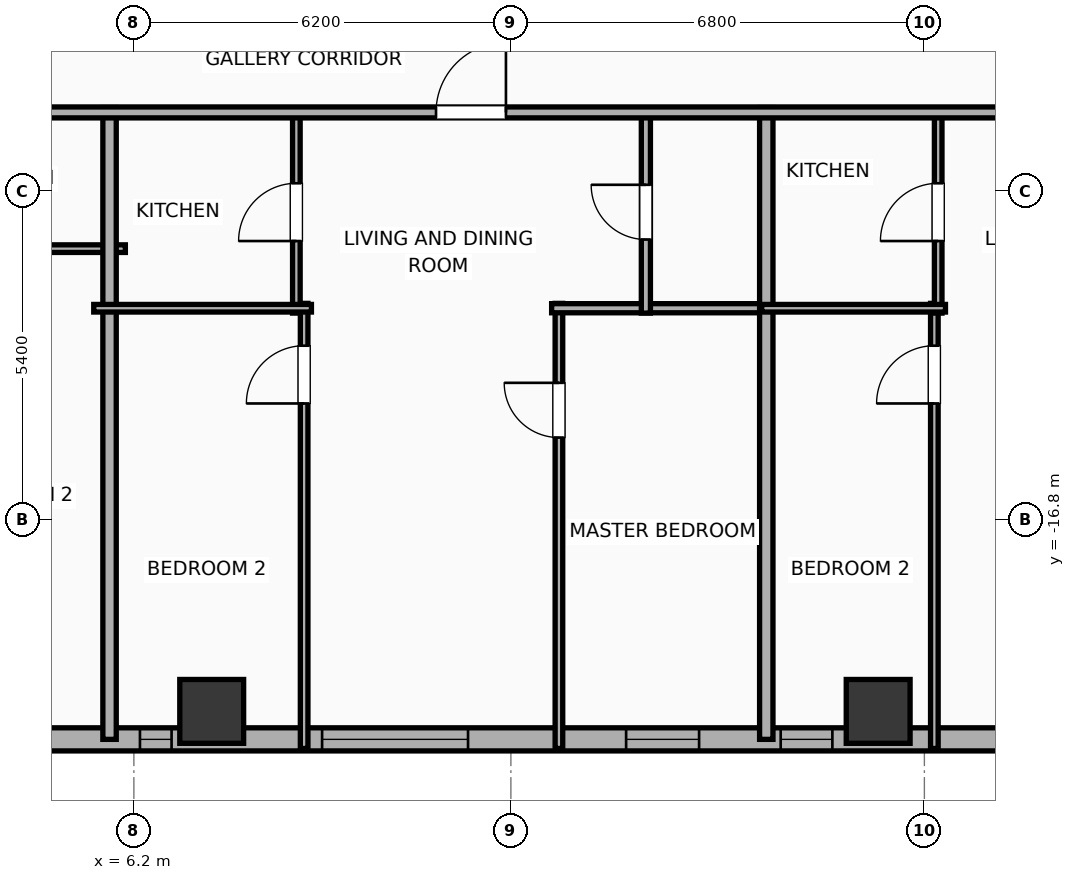
"""IFC4 building model, lengths in metres.
Left out: names, types, materials, properties, quantities, classifications, styles, units other than length and angle.
Written with IfcOpenShell. Run it as: python <this file> out.ifc"""

import sys

from ifc_helpers import new_model, si_unit, direction, frame, frame_2d, origin, origin_2d, place, context, subcontext, project, spatial, rectangle, hollow_rectangle, extrude, element, fill, save


model = new_model("IFC4")
c1 = context("Model", 3, precision=1e-05, world=origin(), true_north=direction((0.0, 1.0)))
c2 = subcontext(c1, "Body", "Model", "MODEL_VIEW")
j1 = project(units=[si_unit("LENGTHUNIT", "METRE"), si_unit("PLANEANGLEUNIT", "RADIAN")], contexts=[c1])
p1 = place(None, origin())
s1 = spatial("IfcSite", under=j1, at=p1, CompositionType="ELEMENT")
p2 = place(p1, origin())
s2 = spatial("IfcBuilding", under=s1, at=p2, CompositionType="ELEMENT")
p3 = place(p2, frame((0.0, 0.0, 101.4)))
s3 = spatial("IfcBuildingStorey", under=s2, at=p3, CompositionType="ELEMENT", Elevation=101.4)
for number, where, z_axis, x_axis in (
    (1, (7.48, -19.95, 0.0), (0.0, 0.0, 1.0), (1.0, 0.0, 0.0)),
    (2, (18.44, -19.95, 0.0), (0.0, 0.0, 1.0), (1.0, 0.0, 0.0)),
):
    element("IfcColumn", number, at=place(p3, frame(where, z_axis=z_axis, x_axis=x_axis)), inside=s3, PredefinedType="COLUMN", context=c2, shape_type="SweptSolid", body=[
        extrude(hollow_rectangle(XDim=1.05, YDim=1.05, WallThickness=0.036, at=origin_2d()), origin(), (0.0, 0.0, 1.0), 3.9),
    ])
p4 = place(p3, frame((29.381, -20.41, 0.0), z_axis=(0.0, 0.0, 1.0), x_axis=(-1.0, 0.0, 0.0)))
e3 = element("IfcWall", 3, at=p4, inside=s3, PredefinedType="ELEMENTEDWALL", context=c2, shape_type="SweptSolid", body=[
    extrude(rectangle(XDim=54.763, YDim=0.38, at=frame_2d((27.381, 0.0))), origin(), (0.0, 0.0, 1.0), 3.65),
])
p5 = place(p4, frame((6.495, 0.0, 0.75)))
e4 = element("IfcOpeningElement", 4, at=p5, cuts=e3, PredefinedType="OPENING", context=c2, shape_type="SweptSolid", body=[
    extrude(rectangle(XDim=2.4, YDim=2.1, at=frame_2d((1.2, 1.05))), frame((0.0, 0.2, 0.0), z_axis=(0.0, -1.0, 0.0), x_axis=(1.0, 0.0, 0.0)), (0.0, 0.0, 1.0), 0.4),
])
p6 = place(p4, frame((17.686, 0.0, 0.75)))
e5 = element("IfcOpeningElement", 5, at=p6, cuts=e3, PredefinedType="OPENING", context=c2, shape_type="SweptSolid", body=[
    extrude(rectangle(XDim=2.4, YDim=2.1, at=frame_2d((1.2, 1.05))), frame((0.0, 0.2, 0.0), z_axis=(0.0, -1.0, 0.0), x_axis=(1.0, 0.0, 0.0)), (0.0, 0.0, 1.0), 0.4),
])
p7 = place(p4, frame((34.677, 0.0, 0.75)))
e6 = element("IfcOpeningElement", 6, at=p7, cuts=e3, PredefinedType="OPENING", context=c2, shape_type="SweptSolid", body=[
    extrude(rectangle(XDim=2.4, YDim=2.1, at=frame_2d((1.2, 1.05))), frame((0.0, 0.2, 0.0), z_axis=(0.0, -1.0, 0.0), x_axis=(1.0, 0.0, 0.0)), (0.0, 0.0, 1.0), 0.4),
])
p8 = place(p4, frame((45.867, 0.0, 0.75)))
e7 = element("IfcOpeningElement", 7, at=p8, cuts=e3, PredefinedType="OPENING", context=c2, shape_type="SweptSolid", body=[
    extrude(rectangle(XDim=2.4, YDim=2.1, at=frame_2d((1.2, 1.05))), frame((0.0, 0.2, 0.0), z_axis=(0.0, -1.0, 0.0), x_axis=(1.0, 0.0, 0.0)), (0.0, 0.0, 1.0), 0.4),
])
p9 = place(p4, frame((52.281, 0.0, 0.75)))
e8 = element("IfcOpeningElement", 8, at=p9, cuts=e3, PredefinedType="OPENING", context=c2, shape_type="SweptSolid", body=[
    extrude(rectangle(XDim=1.2, YDim=2.05, at=frame_2d((0.6, 1.025))), frame((0.0, 0.2, 0.0), z_axis=(0.0, -1.0, 0.0), x_axis=(1.0, 0.0, 0.0)), (0.0, 0.0, 1.0), 0.4),
])
p10 = place(p4, frame((49.641, 0.0, 0.75)))
e9 = element("IfcOpeningElement", 9, at=p10, cuts=e3, PredefinedType="OPENING", context=c2, shape_type="SweptSolid", body=[
    extrude(rectangle(XDim=1.2, YDim=2.05, at=frame_2d((0.6, 1.025))), frame((0.0, 0.2, 0.0), z_axis=(0.0, -1.0, 0.0), x_axis=(1.0, 0.0, 0.0)), (0.0, 0.0, 1.0), 0.4),
])
p11 = place(p4, frame((39.543, 0.0, 0.75)))
e10 = element("IfcOpeningElement", 10, at=p11, cuts=e3, PredefinedType="OPENING", context=c2, shape_type="SweptSolid", body=[
    extrude(rectangle(XDim=1.2, YDim=2.05, at=frame_2d((0.6, 1.025))), frame((0.0, 0.2, 0.0), z_axis=(0.0, -1.0, 0.0), x_axis=(1.0, 0.0, 0.0)), (0.0, 0.0, 1.0), 0.4),
])
p12 = place(p4, frame((44.538, 0.0, 0.75)))
e11 = element("IfcOpeningElement", 11, at=p12, cuts=e3, PredefinedType="OPENING", context=c2, shape_type="SweptSolid", body=[
    extrude(rectangle(XDim=0.52, YDim=2.05, at=frame_2d((0.26, 1.025))), frame((0.0, 0.2, 0.0), z_axis=(0.0, -1.0, 0.0), x_axis=(1.0, 0.0, 0.0)), (0.0, 0.0, 1.0), 0.4),
])
p13 = place(p4, frame((28.206, 0.0, 0.75)))
e12 = element("IfcOpeningElement", 12, at=p13, cuts=e3, PredefinedType="OPENING", context=c2, shape_type="SweptSolid", body=[
    extrude(rectangle(XDim=1.2, YDim=2.05, at=frame_2d((0.6, 1.025))), frame((0.0, 0.2, 0.0), z_axis=(0.0, -1.0, 0.0), x_axis=(1.0, 0.0, 0.0)), (0.0, 0.0, 1.0), 0.4),
])
p14 = place(p4, frame((31.241, 0.0, 0.75)))
e13 = element("IfcOpeningElement", 13, at=p14, cuts=e3, PredefinedType="OPENING", context=c2, shape_type="SweptSolid", body=[
    extrude(rectangle(XDim=0.85, YDim=2.05, at=frame_2d((0.425, 1.025))), frame((0.0, 0.2, 0.0), z_axis=(0.0, -1.0, 0.0), x_axis=(1.0, 0.0, 0.0)), (0.0, 0.0, 1.0), 0.4),
])
p15 = place(p4, frame((24.561, 0.0, 0.75)))
e14 = element("IfcOpeningElement", 14, at=p15, cuts=e3, PredefinedType="OPENING", context=c2, shape_type="SweptSolid", body=[
    extrude(rectangle(XDim=1.2, YDim=2.05, at=frame_2d((0.6, 1.025))), frame((0.0, 0.2, 0.0), z_axis=(0.0, -1.0, 0.0), x_axis=(1.0, 0.0, 0.0)), (0.0, 0.0, 1.0), 0.4),
])
p16 = place(p4, frame((22.561, 0.0, 0.75)))
e15 = element("IfcOpeningElement", 15, at=p16, cuts=e3, PredefinedType="OPENING", context=c2, shape_type="SweptSolid", body=[
    extrude(rectangle(XDim=0.52, YDim=2.05, at=frame_2d((0.26, 1.025))), frame((0.0, 0.2, 0.0), z_axis=(0.0, -1.0, 0.0), x_axis=(1.0, 0.0, 0.0)), (0.0, 0.0, 1.0), 0.4),
])
p17 = place(p4, frame((13.886, 0.0, 0.75)))
e16 = element("IfcOpeningElement", 16, at=p17, cuts=e3, PredefinedType="OPENING", context=c2, shape_type="SweptSolid", body=[
    extrude(rectangle(XDim=1.2, YDim=2.05, at=frame_2d((0.6, 1.025))), frame((0.0, 0.2, 0.0), z_axis=(0.0, -1.0, 0.0), x_axis=(1.0, 0.0, 0.0)), (0.0, 0.0, 1.0), 0.4),
])
p18 = place(p4, frame((11.694, 0.0, 0.75)))
e17 = element("IfcOpeningElement", 17, at=p18, cuts=e3, PredefinedType="OPENING", context=c2, shape_type="SweptSolid", body=[
    extrude(rectangle(XDim=0.85, YDim=2.05, at=frame_2d((0.425, 1.025))), frame((0.0, 0.2, 0.0), z_axis=(0.0, -1.0, 0.0), x_axis=(1.0, 0.0, 0.0)), (0.0, 0.0, 1.0), 0.4),
])
p19 = place(p4, frame((3.286, 0.0, 0.75)))
e18 = element("IfcOpeningElement", 18, at=p19, cuts=e3, PredefinedType="OPENING", context=c2, shape_type="SweptSolid", body=[
    extrude(rectangle(XDim=1.2, YDim=2.05, at=frame_2d((0.6, 1.025))), frame((0.0, 0.2, 0.0), z_axis=(0.0, -1.0, 0.0), x_axis=(1.0, 0.0, 0.0)), (0.0, 0.0, 1.0), 0.4),
])
p20 = place(p4, frame((0.816, 0.0, 0.75)))
e19 = element("IfcOpeningElement", 19, at=p20, cuts=e3, PredefinedType="OPENING", context=c2, shape_type="SweptSolid", body=[
    extrude(rectangle(XDim=1.2, YDim=2.05, at=frame_2d((0.6, 1.025))), frame((0.0, 0.2, 0.0), z_axis=(0.0, -1.0, 0.0), x_axis=(1.0, 0.0, 0.0)), (0.0, 0.0, 1.0), 0.4),
])
p21 = place(p3, frame((2.56, -12.34, 0.0), z_axis=(0.0, 0.0, 1.0), x_axis=(1.0, 0.0, 0.0)))
e20 = element("IfcWall", 20, at=p21, inside=s3, PredefinedType="PARTITIONING", context=c2, shape_type="SweptSolid", body=[
    extrude(rectangle(XDim=3.5, YDim=0.125, at=frame_2d((1.75, 0.0))), origin(), (0.0, 0.0, 1.0), 3.65),
])
p22 = place(p3, frame((5.8, -20.41, 0.0), z_axis=(0.0, 0.0, 1.0), x_axis=(0.0, 1.0, 0.0)))
e21 = element("IfcWall", 21, at=p22, inside=s3, PredefinedType="PARTITIONING", context=c2, shape_type="SweptSolid", body=[
    extrude(rectangle(XDim=10.39, YDim=0.22, at=frame_2d((5.195, 0.0))), origin(), (0.0, 0.0, 1.0), 3.04),
])
p23 = place(p3, frame((9.0, -20.56, 0.0), z_axis=(0.0, 0.0, 1.0), x_axis=(0.0, 1.0, 0.0)))
e22 = element("IfcWall", 22, at=p23, inside=s3, PredefinedType="PARTITIONING", context=c2, shape_type="SweptSolid", body=[
    extrude(rectangle(XDim=7.32, YDim=0.125, at=frame_2d((3.66, 0.0))), origin(), (0.0, 0.0, 1.0), 3.65),
])
p24 = place(p23, frame((5.674, 0.0, 0.0)))
e23 = element("IfcOpeningElement", 23, at=p24, cuts=e22, PredefinedType="OPENING", context=c2, shape_type="SweptSolid", body=[
    extrude(rectangle(XDim=0.95, YDim=2.05, at=frame_2d((0.475, 1.025))), frame((0.0, 0.073, 0.0), z_axis=(0.0, -1.0, 0.0), x_axis=(1.0, 0.0, 0.0)), (0.0, 0.0, 1.0), 0.145),
])
p25 = place(p3, frame((13.19, -20.56, 0.0), z_axis=(0.0, 0.0, 1.0), x_axis=(0.0, 1.0, 0.0)))
e24 = element("IfcWall", 24, at=p25, inside=s3, PredefinedType="PARTITIONING", context=c2, shape_type="SweptSolid", body=[
    extrude(rectangle(XDim=7.32, YDim=0.125, at=frame_2d((3.66, 0.0))), origin(), (0.0, 0.0, 1.0), 3.65),
])
p26 = place(p25, frame((5.113, 0.0, 0.0)))
e25 = element("IfcOpeningElement", 25, at=p26, cuts=e24, PredefinedType="OPENING", context=c2, shape_type="SweptSolid", body=[
    extrude(rectangle(XDim=0.9, YDim=2.05, at=frame_2d((0.45, 1.025))), frame((0.0, 0.073, 0.0), z_axis=(0.0, -1.0, 0.0), x_axis=(1.0, 0.0, 0.0)), (0.0, 0.0, 1.0), 0.145),
])
p27 = place(p3, frame((13.07, -13.32, 0.0), z_axis=(0.0, 0.0, 1.0), x_axis=(1.0, 0.0, 0.0)))
e26 = element("IfcWall", 26, at=p27, inside=s3, PredefinedType="PLUMBINGWALL", context=c2, shape_type="SweptSolid", body=[
    extrude(rectangle(XDim=3.605, YDim=0.15, at=frame_2d((1.802, 0.0))), origin(), (0.0, 0.0, 1.0), 3.65),
])
p28 = place(p3, frame((8.872, -13.4, 0.0), z_axis=(0.0, 0.0, 1.0), x_axis=(0.0, 1.0, 0.0)))
e27 = element("IfcWall", 27, at=p28, inside=s3, PredefinedType="PARTITIONING", context=c2, shape_type="SweptSolid", body=[
    extrude(rectangle(XDim=3.32, YDim=0.125, at=frame_2d((1.66, 0.0))), origin(), (0.0, 0.0, 1.0), 3.65),
])
p29 = place(p28, frame((1.185, 0.0, 0.0)))
e28 = element("IfcOpeningElement", 28, at=p29, cuts=e27, PredefinedType="OPENING", context=c2, shape_type="SweptSolid", body=[
    extrude(rectangle(XDim=0.95, YDim=2.05, at=frame_2d((0.475, 1.025))), frame((0.0, 0.073, 0.0), z_axis=(0.0, -1.0, 0.0), x_axis=(1.0, 0.0, 0.0)), (0.0, 0.0, 1.0), 0.145),
])
p30 = place(p3, frame((5.54, -13.32, 0.0), z_axis=(0.0, 0.0, 1.0), x_axis=(1.0, 0.0, 0.0)))
e29 = element("IfcWall", 29, at=p30, inside=s3, PredefinedType="PARTITIONING", context=c2, shape_type="SweptSolid", body=[
    extrude(rectangle(XDim=3.58, YDim=0.125, at=frame_2d((1.79, 0.0))), origin(), (0.0, 0.0, 1.0), 3.65),
])
p31 = place(p3, frame((14.62, -13.4, 0.0), z_axis=(0.0, 0.0, 1.0), x_axis=(0.0, 1.0, 0.0)))
e30 = element("IfcWall", 30, at=p31, inside=s3, PredefinedType="PLUMBINGWALL", context=c2, shape_type="SweptSolid", body=[
    extrude(rectangle(XDim=3.32, YDim=0.15, at=frame_2d((1.66, 0.0))), origin(), (0.0, 0.0, 1.0), 3.65),
])
p32 = place(p31, frame((1.21, 0.0, 0.0)))
e31 = element("IfcOpeningElement", 31, at=p32, cuts=e30, PredefinedType="OPENING", context=c2, shape_type="SweptSolid", body=[
    extrude(rectangle(XDim=0.9, YDim=2.05, at=frame_2d((0.45, 1.025))), frame((0.0, 0.085, 0.0), z_axis=(0.0, -1.0, 0.0), x_axis=(1.0, 0.0, 0.0)), (0.0, 0.0, 1.0), 0.17),
])
p33 = place(p3, frame((16.6, -20.41, 0.0), z_axis=(0.0, 0.0, 1.0), x_axis=(0.0, 1.0, 0.0)))
e32 = element("IfcWall", 32, at=p33, inside=s3, PredefinedType="PARTITIONING", context=c2, shape_type="SweptSolid", body=[
    extrude(rectangle(XDim=10.39, YDim=0.22, at=frame_2d((5.195, 0.0))), origin(), (0.0, 0.0, 1.0), 3.65),
])
p34 = place(p3, frame((19.364, -20.56, 0.0), z_axis=(0.0, 0.0, 1.0), x_axis=(0.0, 1.0, 0.0)))
e33 = element("IfcWall", 33, at=p34, inside=s3, PredefinedType="PARTITIONING", context=c2, shape_type="SweptSolid", body=[
    extrude(rectangle(XDim=7.32, YDim=0.125, at=frame_2d((3.66, 0.0))), origin(), (0.0, 0.0, 1.0), 3.65),
])
p35 = place(p34, frame((5.674, 0.0, 0.0)))
e34 = element("IfcOpeningElement", 34, at=p35, cuts=e33, PredefinedType="OPENING", context=c2, shape_type="SweptSolid", body=[
    extrude(rectangle(XDim=0.95, YDim=2.05, at=frame_2d((0.475, 1.025))), frame((0.0, 0.073, 0.0), z_axis=(0.0, -1.0, 0.0), x_axis=(1.0, 0.0, 0.0)), (0.0, 0.0, 1.0), 0.145),
])
p36 = place(p3, frame((19.427, -13.4, 0.0), z_axis=(0.0, 0.0, 1.0), x_axis=(0.0, 1.0, 0.0)))
e35 = element("IfcWall", 35, at=p36, inside=s3, PredefinedType="PARTITIONING", context=c2, shape_type="SweptSolid", body=[
    extrude(rectangle(XDim=3.32, YDim=0.125, at=frame_2d((1.66, 0.0))), origin(), (0.0, 0.0, 1.0), 3.65),
])
p37 = place(p36, frame((1.185, 0.0, 0.0)))
e36 = element("IfcOpeningElement", 36, at=p37, cuts=e35, PredefinedType="OPENING", context=c2, shape_type="SweptSolid", body=[
    extrude(rectangle(XDim=0.95, YDim=2.05, at=frame_2d((0.475, 1.025))), frame((0.0, 0.073, 0.0), z_axis=(0.0, -1.0, 0.0), x_axis=(1.0, 0.0, 0.0)), (0.0, 0.0, 1.0), 0.145),
])
p38 = place(p3, frame((16.525, -13.32, 0.0), z_axis=(0.0, 0.0, 1.0), x_axis=(1.0, 0.0, 0.0)))
e37 = element("IfcWall", 37, at=p38, inside=s3, PredefinedType="PARTITIONING", context=c2, shape_type="SweptSolid", body=[
    extrude(rectangle(XDim=3.022, YDim=0.125, at=frame_2d((1.511, 0.0))), origin(), (0.0, 0.0, 1.0), 3.65),
])
p39 = place(p3, frame((-29.21, -10.1, 0.0), z_axis=(0.0, 0.0, 1.0), x_axis=(1.0, 0.0, 0.0)))
e38 = element("IfcWall", 38, at=p39, inside=s3, PredefinedType="PARTITIONING", context=c2, shape_type="SweptSolid", body=[
    extrude(rectangle(XDim=62.42, YDim=0.18, at=frame_2d((31.21, 0.0))), origin(), (0.0, 0.0, 1.0), 3.65),
])
p40 = place(p39, frame((3.033, 0.0, 0.0)))
e39 = element("IfcOpeningElement", 39, at=p40, cuts=e38, PredefinedType="OPENING", context=c2, shape_type="SweptSolid", body=[
    extrude(rectangle(XDim=0.9, YDim=2.05, at=frame_2d((0.45, 1.025))), frame((0.0, 0.1, 0.0), z_axis=(0.0, -1.0, 0.0), x_axis=(1.0, 0.0, 0.0)), (0.0, 0.0, 1.0), 0.2),
])
p41 = place(p39, frame((9.768, 0.0, 0.0)))
e40 = element("IfcOpeningElement", 40, at=p41, cuts=e38, PredefinedType="OPENING", context=c2, shape_type="SweptSolid", body=[
    extrude(rectangle(XDim=0.9, YDim=2.05, at=frame_2d((0.45, 1.025))), frame((0.0, 0.1, 0.0), z_axis=(0.0, -1.0, 0.0), x_axis=(1.0, 0.0, 0.0)), (0.0, 0.0, 1.0), 0.2),
])
p42 = place(p39, frame((18.65, 0.0, 0.0)))
e41 = element("IfcOpeningElement", 41, at=p42, cuts=e38, PredefinedType="OPENING", context=c2, shape_type="SweptSolid", body=[
    extrude(rectangle(XDim=1.15, YDim=2.05, at=frame_2d((0.575, 1.025))), frame((0.0, 0.1, 0.0), z_axis=(0.0, -1.0, 0.0), x_axis=(1.0, 0.0, 0.0)), (0.0, 0.0, 1.0), 0.2),
])
p43 = place(p39, frame((29.212, 0.0, 0.0)))
e42 = element("IfcOpeningElement", 42, at=p43, cuts=e38, PredefinedType="OPENING", context=c2, shape_type="SweptSolid", body=[
    extrude(rectangle(XDim=1.15, YDim=2.05, at=frame_2d((0.575, 1.025))), frame((0.0, 0.1, 0.0), z_axis=(0.0, -1.0, 0.0), x_axis=(1.0, 0.0, 0.0)), (0.0, 0.0, 1.0), 0.2),
])
p44 = place(p39, frame((40.379, 0.0, 0.0)))
e43 = element("IfcOpeningElement", 43, at=p44, cuts=e38, PredefinedType="OPENING", context=c2, shape_type="SweptSolid", body=[
    extrude(rectangle(XDim=1.15, YDim=2.05, at=frame_2d((0.575, 1.025))), frame((0.0, 0.1, 0.0), z_axis=(0.0, -1.0, 0.0), x_axis=(1.0, 0.0, 0.0)), (0.0, 0.0, 1.0), 0.2),
])
p45 = place(p39, frame((50.959, 0.0, 0.0)))
e44 = element("IfcOpeningElement", 44, at=p45, cuts=e38, PredefinedType="OPENING", context=c2, shape_type="SweptSolid", body=[
    extrude(rectangle(XDim=1.15, YDim=2.05, at=frame_2d((0.575, 1.025))), frame((0.0, 0.1, 0.0), z_axis=(0.0, -1.0, 0.0), x_axis=(1.0, 0.0, 0.0)), (0.0, 0.0, 1.0), 0.2),
])
p46 = place(p39, frame((59.117, 0.0, 0.0)))
e45 = element("IfcOpeningElement", 45, at=p46, cuts=e38, PredefinedType="OPENING", context=c2, shape_type="SweptSolid", body=[
    extrude(rectangle(XDim=0.9, YDim=2.05, at=frame_2d((0.45, 1.025))), frame((0.0, 0.1, 0.0), z_axis=(0.0, -1.0, 0.0), x_axis=(1.0, 0.0, 0.0)), (0.0, 0.0, 1.0), 0.2),
])
p47 = place(p6, origin())
e46 = element("IfcWindow", 46, at=p47, inside=s3, PartitioningType="SINGLE_PANEL", PredefinedType="WINDOW", context=c2, shape_type="SweptSolid", body=[
    extrude(rectangle(XDim=2.4, YDim=2.1, at=frame_2d((1.2, 1.05))), frame((0.0, 0.03, 0.0), z_axis=(0.0, -1.0, 0.0), x_axis=(1.0, 0.0, 0.0)), (0.0, 0.0, 1.0), 0.06),
])
fill(e5, e46)
p48 = place(p16, origin())
e47 = element("IfcWindow", 47, at=p48, inside=s3, PartitioningType="SINGLE_PANEL", PredefinedType="WINDOW", context=c2, shape_type="SweptSolid", body=[
    extrude(rectangle(XDim=0.52, YDim=2.05, at=frame_2d((0.26, 1.025))), frame((0.0, 0.03, 0.0), z_axis=(0.0, -1.0, 0.0), x_axis=(1.0, 0.0, 0.0)), (0.0, 0.0, 1.0), 0.06),
])
fill(e15, e47)
p49 = place(p17, origin())
e48 = element("IfcWindow", 48, at=p49, inside=s3, PartitioningType="SINGLE_PANEL", PredefinedType="WINDOW", context=c2, shape_type="SweptSolid", body=[
    extrude(rectangle(XDim=1.2, YDim=2.05, at=frame_2d((0.6, 1.025))), frame((0.0, 0.03, 0.0), z_axis=(0.0, -1.0, 0.0), x_axis=(1.0, 0.0, 0.0)), (0.0, 0.0, 1.0), 0.06),
])
fill(e16, e48)
p50 = place(p18, origin())
e49 = element("IfcWindow", 49, at=p50, inside=s3, PartitioningType="SINGLE_PANEL", PredefinedType="WINDOW", context=c2, shape_type="SweptSolid", body=[
    extrude(rectangle(XDim=0.85, YDim=2.05, at=frame_2d((0.425, 1.025))), frame((0.0, 0.03, 0.0), z_axis=(0.0, -1.0, 0.0), x_axis=(1.0, 0.0, 0.0)), (0.0, 0.0, 1.0), 0.06),
])
fill(e17, e49)
p51 = place(p24, origin())
e50 = element("IfcDoor", 50, at=p51, inside=s3, OperationType="SINGLE_SWING_LEFT", PredefinedType="DOOR", context=c2, shape_type="SweptSolid", body=[
    extrude(rectangle(XDim=0.95, YDim=2.05, at=frame_2d((0.475, 1.025))), frame((0.0, 0.025, 0.0), z_axis=(0.0, -1.0, 0.0), x_axis=(1.0, 0.0, 0.0)), (0.0, 0.0, 1.0), 0.05),
])
fill(e23, e50)
p52 = place(p26, origin())
e51 = element("IfcDoor", 51, at=p52, inside=s3, OperationType="SINGLE_SWING_RIGHT", PredefinedType="DOOR", context=c2, shape_type="SweptSolid", body=[
    extrude(rectangle(XDim=0.9, YDim=2.05, at=frame_2d((0.45, 1.025))), frame((0.0, 0.025, 0.0), z_axis=(0.0, -1.0, 0.0), x_axis=(1.0, 0.0, 0.0)), (0.0, 0.0, 1.0), 0.05),
])
fill(e25, e51)
p53 = place(p29, origin())
e52 = element("IfcDoor", 52, at=p53, inside=s3, OperationType="SINGLE_SWING_LEFT", PredefinedType="DOOR", context=c2, shape_type="SweptSolid", body=[
    extrude(rectangle(XDim=0.95, YDim=2.05, at=frame_2d((0.475, 1.025))), frame((0.0, 0.025, 0.0), z_axis=(0.0, -1.0, 0.0), x_axis=(1.0, 0.0, 0.0)), (0.0, 0.0, 1.0), 0.05),
])
fill(e28, e52)
p54 = place(p32, origin())
e53 = element("IfcDoor", 53, at=p54, inside=s3, OperationType="SINGLE_SWING_RIGHT", PredefinedType="DOOR", context=c2, shape_type="SweptSolid", body=[
    extrude(rectangle(XDim=0.9, YDim=2.05, at=frame_2d((0.45, 1.025))), frame((0.0, 0.025, 0.0), z_axis=(0.0, -1.0, 0.0), x_axis=(1.0, 0.0, 0.0)), (0.0, 0.0, 1.0), 0.05),
])
fill(e31, e53)
p55 = place(p35, origin())
e54 = element("IfcDoor", 54, at=p55, inside=s3, OperationType="SINGLE_SWING_LEFT", PredefinedType="DOOR", context=c2, shape_type="SweptSolid", body=[
    extrude(rectangle(XDim=0.95, YDim=2.05, at=frame_2d((0.475, 1.025))), frame((0.0, 0.025, 0.0), z_axis=(0.0, -1.0, 0.0), x_axis=(1.0, 0.0, 0.0)), (0.0, 0.0, 1.0), 0.05),
])
fill(e34, e54)
p56 = place(p37, origin())
e55 = element("IfcDoor", 55, at=p56, inside=s3, OperationType="SINGLE_SWING_LEFT", PredefinedType="DOOR", context=c2, shape_type="SweptSolid", body=[
    extrude(rectangle(XDim=0.95, YDim=2.05, at=frame_2d((0.475, 1.025))), frame((0.0, 0.025, 0.0), z_axis=(0.0, -1.0, 0.0), x_axis=(1.0, 0.0, 0.0)), (0.0, 0.0, 1.0), 0.05),
])
fill(e36, e55)
p57 = place(p44, origin())
e56 = element("IfcDoor", 56, at=p57, inside=s3, OperationType="SINGLE_SWING_RIGHT", PredefinedType="DOOR", context=c2, shape_type="SweptSolid", body=[
    extrude(rectangle(XDim=1.15, YDim=2.05, at=frame_2d((0.575, 1.025))), frame((0.0, 0.025, 0.0), z_axis=(0.0, -1.0, 0.0), x_axis=(1.0, 0.0, 0.0)), (0.0, 0.0, 1.0), 0.05),
])
fill(e43, e56)
save(model, sys.argv[1])
